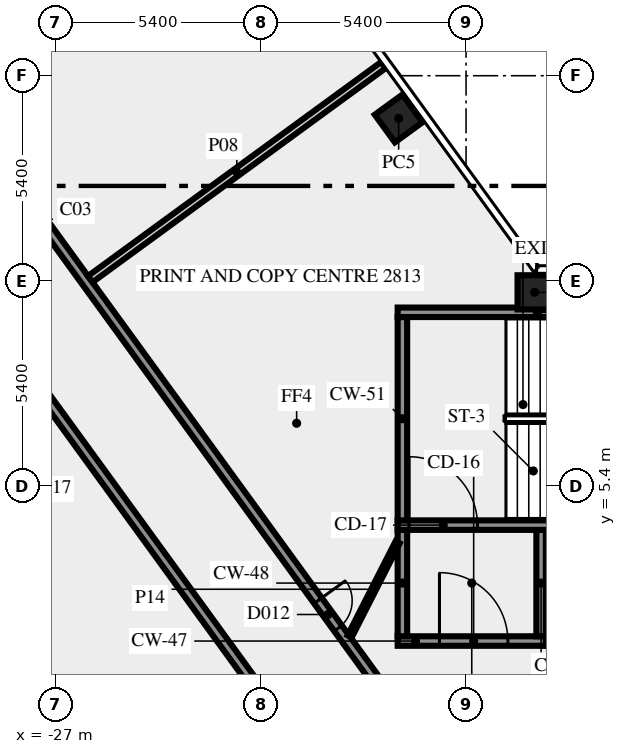
"""IFC4 building model, lengths in metres.
Left out: names, types, materials, properties, quantities, classifications, styles, units other than length and angle.
Written with IfcOpenShell. Run it as: python <this file> out.ifc"""

import sys

from ifc_helpers import new_model, si_unit, direction, frame, frame_2d, origin, origin_2d, place, context, subcontext, project, spatial, rectangle, extrude, element, fill, save


model = new_model("IFC4")
c1 = context("Model", 3, precision=1e-05, world=origin(), true_north=direction((0.0, 1.0)))
c2 = subcontext(c1, "Body", "Model", "MODEL_VIEW")
j1 = project(units=[si_unit("LENGTHUNIT", "METRE"), si_unit("PLANEANGLEUNIT", "RADIAN")], contexts=[c1])
p1 = place(None, origin())
s1 = spatial("IfcSite", under=j1, at=p1, CompositionType="ELEMENT")
p2 = place(p1, origin())
s2 = spatial("IfcBuilding", under=s1, at=p2, CompositionType="ELEMENT")
p3 = place(p2, frame((0.0, 0.0, 121.0)))
s3 = spatial("IfcBuildingStorey", under=s2, at=p3, CompositionType="ELEMENT", Elevation=121.0)
for number, where, z_axis, x_axis in (
    (1, (-17.974, 15.075, 0.0), (0.0, 0.0, 1.0), (-0.588, 0.809, 0.0)),
    (2, (-14.395, 10.5, 0.0), (0.0, 0.0, 1.0), (-1.0, 0.0, 0.0)),
):
    element("IfcColumn", number, at=place(p3, frame(where, z_axis=z_axis, x_axis=x_axis)), inside=s3, PredefinedType="COLUMN", context=c2, shape_type="SweptSolid", body=[
        extrude(rectangle(XDim=0.9, YDim=0.9, at=origin_2d()), origin(), (0.0, 0.0, 1.0), 3.65),
    ])
p4 = place(p3, frame((-18.0, 1.325, 0.0), z_axis=(0.0, 0.0, 1.0), x_axis=(1.0, 0.0, 0.0)))
e3 = element("IfcWall", 3, at=p4, inside=s3, PredefinedType="SHEAR", context=c2, shape_type="SweptSolid", body=[
    extrude(rectangle(XDim=3.9, YDim=0.25, at=frame_2d((1.95, 0.0))), origin(), (0.0, 0.0, 1.0), 3.65),
])
p5 = place(p4, frame((1.1, 0.0, 0.0)))
e4 = element("IfcOpeningElement", 4, at=p5, cuts=e3, PredefinedType="OPENING", context=c2, shape_type="SweptSolid", body=[
    extrude(rectangle(XDim=1.8, YDim=2.1, at=frame_2d((0.9, 1.05))), frame((0.0, 0.135, 0.0), z_axis=(0.0, -1.0, 0.0), x_axis=(1.0, 0.0, 0.0)), (0.0, 0.0, 1.0), 0.27),
])
for number, where, z_axis, x_axis in (
    (5, (-17.875, 1.45, 0.0), (0.0, 0.0, 1.0), (0.0, 1.0, 0.0)),
    (6, (-14.225, 1.45, 0.0), (0.0, 0.0, 1.0), (0.0, 1.0, 0.0)),
):
    element("IfcWall", number, at=place(p3, frame(where, z_axis=z_axis, x_axis=x_axis)), inside=s3, PredefinedType="SHEAR", context=c2, shape_type="SweptSolid", body=[
        extrude(rectangle(XDim=2.8, YDim=0.25, at=frame_2d((1.4, 0.0))), origin(), (0.0, 0.0, 1.0), 3.65),
    ])
p6 = place(p3, frame((-18.0, 4.375, 0.0), z_axis=(0.0, 0.0, 1.0), x_axis=(1.0, 0.0, 0.0)))
e7 = element("IfcWall", 7, at=p6, inside=s3, PredefinedType="SHEAR", context=c2, shape_type="SweptSolid", body=[
    extrude(rectangle(XDim=10.5, YDim=0.25, at=frame_2d((5.25, 0.0))), origin(), (0.0, 0.0, 1.0), 3.65),
])
p7 = place(p6, frame((0.3, 0.0, 0.0)))
e8 = element("IfcOpeningElement", 8, at=p7, cuts=e7, PredefinedType="OPENING", context=c2, shape_type="SweptSolid", body=[
    extrude(rectangle(XDim=1.8, YDim=2.1, at=frame_2d((0.9, 1.05))), frame((0.0, 0.135, 0.0), z_axis=(0.0, -1.0, 0.0), x_axis=(1.0, 0.0, 0.0)), (0.0, 0.0, 1.0), 0.27),
])
p8 = place(p3, frame((-17.875, 4.5, 0.0), z_axis=(0.0, 0.0, 1.0), x_axis=(0.0, 1.0, 0.0)))
e9 = element("IfcWall", 9, at=p8, inside=s3, PredefinedType="SHEAR", context=c2, shape_type="SweptSolid", body=[
    extrude(rectangle(XDim=5.35, YDim=0.25, at=frame_2d((2.675, 0.0))), origin(), (0.0, 0.0, 1.0), 3.65),
])
p9 = place(p3, frame((-18.0, 9.975, 0.0), z_axis=(0.0, 0.0, 1.0), x_axis=(1.0, 0.0, 0.0)))
e10 = element("IfcWall", 10, at=p9, inside=s3, PredefinedType="SHEAR", context=c2, shape_type="SweptSolid", body=[
    extrude(rectangle(XDim=10.5, YDim=0.25, at=frame_2d((5.25, 0.0))), origin(), (0.0, 0.0, 1.0), 3.65),
])
p10 = place(p9, frame((4.5, 0.0, 1.0)))
e11 = element("IfcOpeningElement", 11, at=p10, cuts=e10, PredefinedType="OPENING", context=c2, shape_type="SweptSolid", body=[
    extrude(rectangle(XDim=1.2, YDim=1.2, at=frame_2d((0.6, 0.6))), frame((0.0, 0.135, 0.0), z_axis=(0.0, -1.0, 0.0), x_axis=(1.0, 0.0, 0.0)), (0.0, 0.0, 1.0), 0.27),
])
p11 = place(p3, frame((-20.531, -1.523, 0.0), z_axis=(0.0, 0.0, 1.0), x_axis=(-0.587784522481, 0.809017524614, 0.0)))
e12 = element("IfcWall", 12, at=p11, inside=s3, PredefinedType="SOLIDWALL", context=c2, shape_type="SweptSolid", body=[
    extrude(rectangle(XDim=49.912, YDim=0.25, at=frame_2d((24.956, 0.0))), origin(), (0.0, 0.0, 1.0), 3.65),
])
p12 = place(p11, frame((34.816, 0.0, 0.0)))
e13 = element("IfcOpeningElement", 13, at=p12, cuts=e12, PredefinedType="OPENING", context=c2, shape_type="SweptSolid", body=[
    extrude(rectangle(XDim=0.9, YDim=2.1, at=frame_2d((0.45, 1.05))), frame((0.0, 0.135, 0.0), z_axis=(0.0, -1.0, 0.0), x_axis=(1.0, 0.0, 0.0)), (0.0, 0.0, 1.0), 0.27),
])
p13 = place(p11, frame((33.215, 0.0, 0.0)))
e14 = element("IfcOpeningElement", 14, at=p13, cuts=e12, PredefinedType="OPENING", context=c2, shape_type="SweptSolid", body=[
    extrude(rectangle(XDim=0.9, YDim=2.1, at=frame_2d((0.45, 1.05))), frame((0.0, 0.135, 0.0), z_axis=(0.0, -1.0, 0.0), x_axis=(1.0, 0.0, 0.0)), (0.0, 0.0, 1.0), 0.27),
])
p14 = place(p11, frame((22.916, 0.0, 0.0)))
e15 = element("IfcOpeningElement", 15, at=p14, cuts=e12, PredefinedType="OPENING", context=c2, shape_type="SweptSolid", body=[
    extrude(rectangle(XDim=1.8, YDim=2.1, at=frame_2d((0.9, 1.05))), frame((0.0, 0.135, 0.0), z_axis=(0.0, -1.0, 0.0), x_axis=(1.0, 0.0, 0.0)), (0.0, 0.0, 1.0), 0.27),
])
p15 = place(p11, frame((0.483, 0.0, 0.0)))
e16 = element("IfcOpeningElement", 16, at=p15, cuts=e12, PredefinedType="OPENING", context=c2, shape_type="SweptSolid", body=[
    extrude(rectangle(XDim=1.8, YDim=2.1, at=frame_2d((0.9, 1.05))), frame((0.0, 0.135, 0.0), z_axis=(0.0, -1.0, 0.0), x_axis=(1.0, 0.0, 0.0)), (0.0, 0.0, 1.0), 0.27),
])
p16 = place(p11, frame((25.365, 0.0, 0.0)))
e17 = element("IfcOpeningElement", 17, at=p16, cuts=e12, PredefinedType="OPENING", context=c2, shape_type="SweptSolid", body=[
    extrude(rectangle(XDim=0.9, YDim=2.1, at=frame_2d((0.45, 1.05))), frame((0.0, 0.135, 0.0), z_axis=(0.0, -1.0, 0.0), x_axis=(1.0, 0.0, 0.0)), (0.0, 0.0, 1.0), 0.27),
])
p17 = place(p3, frame((-37.232, 25.972, 0.0), z_axis=(0.0, 0.0, 1.0), x_axis=(0.587786323093, -0.809016216391, 0.0)))
e18 = element("IfcWall", 18, at=p17, inside=s3, PredefinedType="SOLIDWALL", context=c2, shape_type="SweptSolid", body=[
    extrude(rectangle(XDim=33.493, YDim=0.25, at=frame_2d((16.747, 0.0))), origin(), (0.0, 0.0, 1.0), 3.65),
])
p18 = place(p17, frame((9.785, 0.0, 0.0)))
e19 = element("IfcOpeningElement", 19, at=p18, cuts=e18, PredefinedType="OPENING", context=c2, shape_type="SweptSolid", body=[
    extrude(rectangle(XDim=1.8, YDim=2.1, at=frame_2d((0.9, 1.05))), frame((0.0, 0.135, 0.0), z_axis=(0.0, -1.0, 0.0), x_axis=(1.0, 0.0, 0.0)), (0.0, 0.0, 1.0), 0.27),
])
p19 = place(p17, frame((29.152, 0.0, 0.0)))
e20 = element("IfcOpeningElement", 20, at=p19, cuts=e18, PredefinedType="OPENING", context=c2, shape_type="SweptSolid", body=[
    extrude(rectangle(XDim=0.9, YDim=2.1, at=frame_2d((0.45, 1.05))), frame((0.0, 0.135, 0.0), z_axis=(0.0, -1.0, 0.0), x_axis=(1.0, 0.0, 0.0)), (0.0, 0.0, 1.0), 0.27),
])
p20 = place(p17, frame((1.335, 0.0, 0.0)))
e21 = element("IfcOpeningElement", 21, at=p20, cuts=e18, PredefinedType="OPENING", context=c2, shape_type="SweptSolid", body=[
    extrude(rectangle(XDim=0.9, YDim=2.1, at=frame_2d((0.45, 1.05))), frame((0.0, 0.135, 0.0), z_axis=(0.0, -1.0, 0.0), x_axis=(1.0, 0.0, 0.0)), (0.0, 0.0, 1.0), 0.27),
])
p21 = place(p3, frame((-26.089, 10.848, 0.0), z_axis=(0.0, 0.0, 1.0), x_axis=(0.807661302092, 0.589646691759, 0.0)))
e22 = element("IfcWall", 22, at=p21, inside=s3, PredefinedType="SOLIDWALL", context=c2, shape_type="SweptSolid", body=[
    extrude(rectangle(XDim=9.55, YDim=0.2, at=frame_2d((4.775, 0.0))), origin(), (0.0, 0.0, 1.0), 2.75),
])
p22 = place(p3, frame((-19.261, 1.45, 0.0), z_axis=(0.0, 0.0, 1.0), x_axis=(0.453950796792, 0.891026752736, 0.0)))
e23 = element("IfcWall", 23, at=p22, inside=s3, PredefinedType="PARTITIONING", context=c2, shape_type="SweptSolid", body=[
    extrude(rectangle(XDim=2.778, YDim=0.12, at=frame_2d((1.389, 0.0))), origin(), (0.0, 0.0, 1.0), 3.65),
])
p23 = place(p5, origin())
e24 = element("IfcDoor", 24, at=p23, inside=s3, OperationType="DOUBLE_DOOR_SINGLE_SWING", PredefinedType="DOOR", context=c2, shape_type="SweptSolid", body=[
    extrude(rectangle(XDim=1.8, YDim=2.1, at=frame_2d((0.9, 1.05))), frame((0.0, 0.025, 0.0), z_axis=(0.0, -1.0, 0.0), x_axis=(1.0, 0.0, 0.0)), (0.0, 0.0, 1.0), 0.05),
])
fill(e4, e24)
p24 = place(p7, origin())
e25 = element("IfcDoor", 25, at=p24, inside=s3, OperationType="DOUBLE_DOOR_SINGLE_SWING", PredefinedType="DOOR", context=c2, shape_type="SweptSolid", body=[
    extrude(rectangle(XDim=1.8, YDim=2.1, at=frame_2d((0.9, 1.05))), frame((0.0, 0.025, 0.0), z_axis=(0.0, -1.0, 0.0), x_axis=(1.0, 0.0, 0.0)), (0.0, 0.0, 1.0), 0.05),
])
fill(e8, e25)
p25 = place(p19, origin())
e26 = element("IfcDoor", 26, at=p25, inside=s3, OperationType="SINGLE_SWING_RIGHT", PredefinedType="DOOR", context=c2, shape_type="SweptSolid", body=[
    extrude(rectangle(XDim=0.9, YDim=2.1, at=frame_2d((0.45, 1.05))), frame((0.0, 0.025, 0.0), z_axis=(0.0, -1.0, 0.0), x_axis=(1.0, 0.0, 0.0)), (0.0, 0.0, 1.0), 0.05),
])
fill(e20, e26)
save(model, sys.argv[1])
